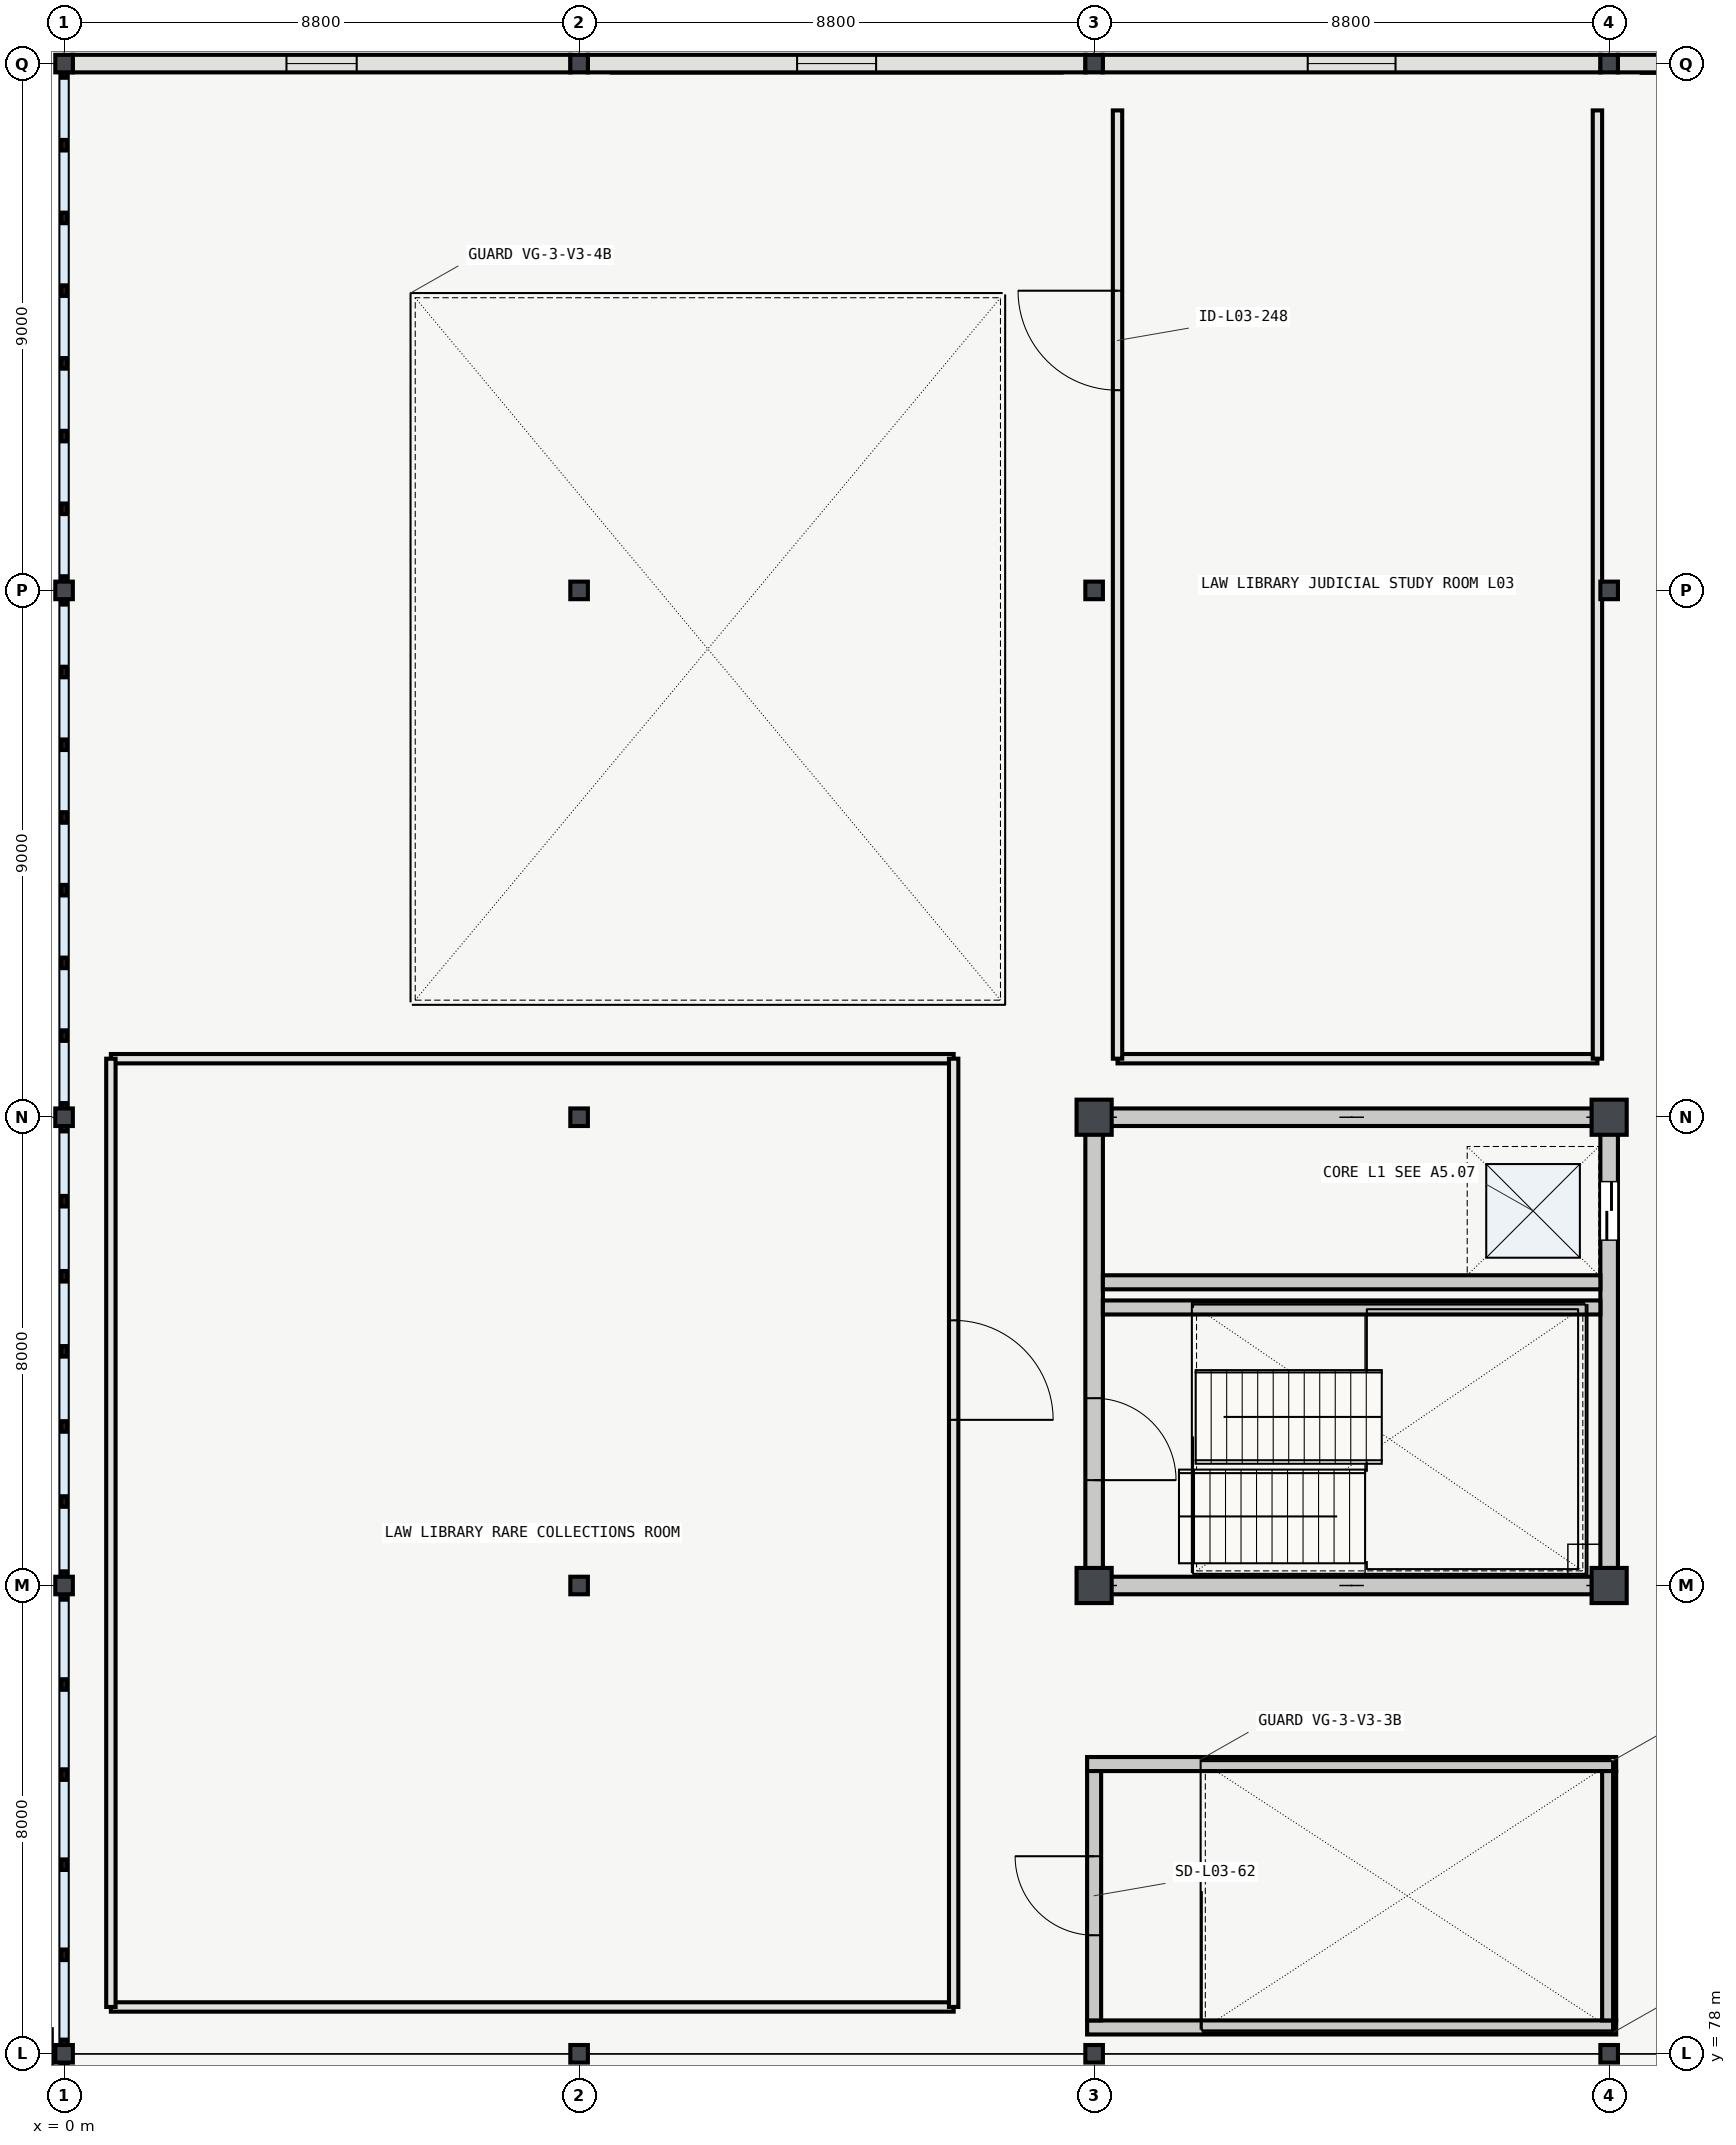
"""IFC4 building model, lengths in metres.
Left out: names, types, materials, properties, quantities, classifications, styles, units other than length and angle.
Written with IfcOpenShell. Run it as: python <this file> out.ifc"""

import sys

from ifc_helpers import new_model, si_unit, direction, frame, frame_2d, origin, origin_2d, place, context, subcontext, project, spatial, rectangle, i_section, extrude, element, fill, save


model = new_model("IFC4")
c1 = context("Model", 3, precision=1e-05, world=origin(), true_north=direction((0.0, 1.0)))
c2 = subcontext(c1, "Body", "Model", "MODEL_VIEW")
j1 = project(units=[si_unit("LENGTHUNIT", "METRE"), si_unit("PLANEANGLEUNIT", "RADIAN")], contexts=[c1])
p1 = place(None, origin())
s1 = spatial("IfcSite", under=j1, at=p1, CompositionType="ELEMENT")
p2 = place(p1, origin())
s2 = spatial("IfcBuilding", under=s1, at=p2, CompositionType="ELEMENT")
p3 = place(p2, frame((0.0, 0.0, 16.2)))
s3 = spatial("IfcBuildingStorey", under=s2, at=p3, CompositionType="ELEMENT", Elevation=16.2)
for number, where, z_axis, x_axis in (
    (1, (0.0, 78.0, 0.0), (0.0, 0.0, 1.0), (1.0, 0.0, 0.0)),
    (2, (0.0, 86.0, 0.0), (0.0, 0.0, 1.0), (1.0, 0.0, 0.0)),
    (3, (0.0, 94.0, 0.0), (0.0, 0.0, 1.0), (1.0, 0.0, 0.0)),
    (4, (0.0, 103.0, 0.0), (0.0, 0.0, 1.0), (1.0, 0.0, 0.0)),
    (5, (0.0, 112.0, 0.0), (0.0, 0.0, 1.0), (1.0, 0.0, 0.0)),
    (6, (8.8, 78.0, 0.0), (0.0, 0.0, 1.0), (1.0, 0.0, 0.0)),
    (7, (8.8, 86.0, 0.0), (0.0, 0.0, 1.0), (1.0, 0.0, 0.0)),
    (8, (8.8, 94.0, 0.0), (0.0, 0.0, 1.0), (1.0, 0.0, 0.0)),
    (9, (8.8, 103.0, 0.0), (0.0, 0.0, 1.0), (1.0, 0.0, 0.0)),
    (10, (8.8, 112.0, 0.0), (0.0, 0.0, 1.0), (1.0, 0.0, 0.0)),
    (11, (17.6, 78.0, 0.0), (0.0, 0.0, 1.0), (1.0, 0.0, 0.0)),
):
    element("IfcColumn", number, at=place(p3, frame(where, z_axis=z_axis, x_axis=x_axis)), inside=s3, PredefinedType="COLUMN", context=c2, shape_type="SweptSolid", body=[
        extrude(i_section(OverallWidth=0.3, OverallDepth=0.3, WebThickness=0.01, FlangeThickness=0.015, FilletRadius=0.018, at=origin_2d()), origin(), (0.0, 0.0, 1.0), 4.2),
    ])
for number, where, z_axis, x_axis in (
    (12, (17.6, 86.0, 0.0), (0.0, 0.0, 1.0), (1.0, 0.0, 0.0)),
    (13, (17.6, 94.0, 0.0), (0.0, 0.0, 1.0), (1.0, 0.0, 0.0)),
):
    element("IfcColumn", number, at=place(p3, frame(where, z_axis=z_axis, x_axis=x_axis)), inside=s3, PredefinedType="COLUMN", context=c2, shape_type="SweptSolid", body=[
        extrude(rectangle(XDim=0.6, YDim=0.6, at=origin_2d()), origin(), (0.0, 0.0, 1.0), 4.2),
    ])
for number, where, z_axis, x_axis in (
    (14, (17.6, 103.0, 0.0), (0.0, 0.0, 1.0), (1.0, 0.0, 0.0)),
    (15, (17.6, 112.0, 0.0), (0.0, 0.0, 1.0), (1.0, 0.0, 0.0)),
    (16, (26.4, 78.0, 0.0), (0.0, 0.0, 1.0), (1.0, 0.0, 0.0)),
):
    element("IfcColumn", number, at=place(p3, frame(where, z_axis=z_axis, x_axis=x_axis)), inside=s3, PredefinedType="COLUMN", context=c2, shape_type="SweptSolid", body=[
        extrude(i_section(OverallWidth=0.3, OverallDepth=0.3, WebThickness=0.01, FlangeThickness=0.015, FilletRadius=0.018, at=origin_2d()), origin(), (0.0, 0.0, 1.0), 4.2),
    ])
for number, where, z_axis, x_axis in (
    (17, (26.4, 86.0, 0.0), (0.0, 0.0, 1.0), (1.0, 0.0, 0.0)),
    (18, (26.4, 94.0, 0.0), (0.0, 0.0, 1.0), (1.0, 0.0, 0.0)),
):
    element("IfcColumn", number, at=place(p3, frame(where, z_axis=z_axis, x_axis=x_axis)), inside=s3, PredefinedType="COLUMN", context=c2, shape_type="SweptSolid", body=[
        extrude(rectangle(XDim=0.6, YDim=0.6, at=origin_2d()), origin(), (0.0, 0.0, 1.0), 4.2),
    ])
for number, where, z_axis, x_axis in (
    (19, (26.4, 103.0, 0.0), (0.0, 0.0, 1.0), (1.0, 0.0, 0.0)),
    (20, (26.4, 112.0, 0.0), (0.0, 0.0, 1.0), (1.0, 0.0, 0.0)),
):
    element("IfcColumn", number, at=place(p3, frame(where, z_axis=z_axis, x_axis=x_axis)), inside=s3, PredefinedType="COLUMN", context=c2, shape_type="SweptSolid", body=[
        extrude(i_section(OverallWidth=0.3, OverallDepth=0.3, WebThickness=0.01, FlangeThickness=0.015, FilletRadius=0.018, at=origin_2d()), origin(), (0.0, 0.0, 1.0), 4.2),
    ])
p4 = place(p3, frame((8.654, 112.0, 0.0), z_axis=(0.0, 0.0, 1.0), x_axis=(-1.0, 0.0, 0.0)))
e21 = element("IfcWall", 21, at=p4, inside=s3, PredefinedType="SOLIDWALL", context=c2, shape_type="SweptSolid", body=[
    extrude(rectangle(XDim=8.508, YDim=0.3, at=frame_2d((4.254, 0.0))), origin(), (0.0, 0.0, 1.0), 3.603),
])
p5 = place(p4, frame((3.654, 0.0, 0.95)))
e22 = element("IfcOpeningElement", 22, at=p5, cuts=e21, PredefinedType="OPENING", context=c2, shape_type="SweptSolid", body=[
    extrude(rectangle(XDim=1.2, YDim=2.1, at=frame_2d((0.6, 1.05))), frame((0.0, 0.16, 0.0), z_axis=(0.0, -1.0, 0.0), x_axis=(1.0, 0.0, 0.0)), (0.0, 0.0, 1.0), 0.32),
])
p6 = place(p3, frame((17.454, 112.0, 0.0), z_axis=(0.0, 0.0, 1.0), x_axis=(-1.0, 0.0, 0.0)))
e23 = element("IfcWall", 23, at=p6, inside=s3, PredefinedType="SOLIDWALL", context=c2, shape_type="SweptSolid", body=[
    extrude(rectangle(XDim=8.508, YDim=0.3, at=frame_2d((4.254, 0.0))), origin(), (0.0, 0.0, 1.0), 3.603),
])
p7 = place(p6, frame((3.579, 0.0, 0.95)))
e24 = element("IfcOpeningElement", 24, at=p7, cuts=e23, PredefinedType="OPENING", context=c2, shape_type="SweptSolid", body=[
    extrude(rectangle(XDim=1.35, YDim=2.1, at=frame_2d((0.675, 1.05))), frame((0.0, 0.16, 0.0), z_axis=(0.0, -1.0, 0.0), x_axis=(1.0, 0.0, 0.0)), (0.0, 0.0, 1.0), 0.32),
])
p8 = place(p3, frame((26.254, 112.0, 0.0), z_axis=(0.0, 0.0, 1.0), x_axis=(-1.0, 0.0, 0.0)))
e25 = element("IfcWall", 25, at=p8, inside=s3, PredefinedType="SOLIDWALL", context=c2, shape_type="SweptSolid", body=[
    extrude(rectangle(XDim=8.508, YDim=0.3, at=frame_2d((4.254, 0.0))), origin(), (0.0, 0.0, 1.0), 3.603),
])
p9 = place(p8, frame((3.504, 0.0, 0.95)))
e26 = element("IfcOpeningElement", 26, at=p9, cuts=e25, PredefinedType="OPENING", context=c2, shape_type="SweptSolid", body=[
    extrude(rectangle(XDim=1.5, YDim=2.1, at=frame_2d((0.75, 1.05))), frame((0.0, 0.16, 0.0), z_axis=(0.0, -1.0, 0.0), x_axis=(1.0, 0.0, 0.0)), (0.0, 0.0, 1.0), 0.32),
])
p10 = place(p3, frame((35.054, 112.0, 0.0), z_axis=(0.0, 0.0, 1.0), x_axis=(-1.0, 0.0, 0.0)))
e27 = element("IfcWall", 27, at=p10, inside=s3, PredefinedType="SOLIDWALL", context=c2, shape_type="SweptSolid", body=[
    extrude(rectangle(XDim=8.508, YDim=0.3, at=frame_2d((4.254, 0.0))), origin(), (0.0, 0.0, 1.0), 3.603),
])
p11 = place(p10, frame((3.429, 0.0, 0.95)))
e28 = element("IfcOpeningElement", 28, at=p11, cuts=e27, PredefinedType="OPENING", context=c2, shape_type="SweptSolid", body=[
    extrude(rectangle(XDim=1.65, YDim=2.1, at=frame_2d((0.825, 1.05))), frame((0.0, 0.16, 0.0), z_axis=(0.0, -1.0, 0.0), x_axis=(1.0, 0.0, 0.0)), (0.0, 0.0, 1.0), 0.32),
])
for number, where, z_axis, x_axis in (
    (29, (17.45, 86.0, 0.0), (0.0, 0.0, 1.0), (1.0, 0.0, 0.0)),
    (30, (26.55, 94.0, 0.0), (0.0, 0.0, 1.0), (-1.0, 0.0, 0.0)),
):
    element("IfcWall", number, at=place(p3, frame(where, z_axis=z_axis, x_axis=x_axis)), inside=s3, PredefinedType="SHEAR", context=c2, shape_type="SweptSolid", body=[
        extrude(rectangle(XDim=9.1, YDim=0.3, at=frame_2d((4.55, 0.0))), origin(), (0.0, 0.0, 1.0), 3.92),
    ])
p12 = place(p3, frame((17.6, 86.15, 0.0), z_axis=(0.0, 0.0, 1.0), x_axis=(0.0, 1.0, 0.0)))
e31 = element("IfcWall", 31, at=p12, inside=s3, PredefinedType="SHEAR", context=c2, shape_type="SweptSolid", body=[
    extrude(rectangle(XDim=7.7, YDim=0.3, at=frame_2d((3.85, 0.0))), origin(), (0.0, 0.0, 1.0), 3.92),
])
p13 = place(p12, frame((1.65, 0.0, 0.0)))
e32 = element("IfcOpeningElement", 32, at=p13, cuts=e31, PredefinedType="OPENING", context=c2, shape_type="SweptSolid", body=[
    extrude(rectangle(XDim=1.4, YDim=2.2, at=frame_2d((0.7, 1.1))), frame((0.0, 0.16, 0.0), z_axis=(0.0, -1.0, 0.0), x_axis=(1.0, 0.0, 0.0)), (0.0, 0.0, 1.0), 0.32),
])
p14 = place(p3, frame((26.4, 86.15, 0.0), z_axis=(0.0, 0.0, 1.0), x_axis=(0.0, 1.0, 0.0)))
e33 = element("IfcWall", 33, at=p14, inside=s3, PredefinedType="SHEAR", context=c2, shape_type="SweptSolid", body=[
    extrude(rectangle(XDim=7.7, YDim=0.3, at=frame_2d((3.85, 0.0))), origin(), (0.0, 0.0, 1.0), 3.92),
])
p15 = place(p14, frame((5.75, 0.0, 0.0)))
e34 = element("IfcOpeningElement", 34, at=p15, cuts=e33, PredefinedType="OPENING", context=c2, shape_type="SweptSolid", body=[
    extrude(rectangle(XDim=1.0, YDim=2.15, at=frame_2d((0.5, 1.075))), frame((0.0, 0.16, 0.0), z_axis=(0.0, -1.0, 0.0), x_axis=(1.0, 0.0, 0.0)), (0.0, 0.0, 1.0), 0.32),
])
p16 = place(p3, frame((17.75, 91.18, 0.0), z_axis=(0.0, 0.0, 1.0), x_axis=(1.0, 0.0, 0.0)))
e35 = element("IfcWall", 35, at=p16, inside=s3, PredefinedType="SHEAR", context=c2, shape_type="SweptSolid", body=[
    extrude(rectangle(XDim=8.5, YDim=0.24, at=frame_2d((4.25, 0.0))), origin(), (0.0, 0.0, 1.0), 3.92),
])
for number, where, z_axis, x_axis in (
    (36, (0.8, 78.8, 0.0), (0.0, 0.0, 1.0), (1.0, 0.0, 0.0)),
    (37, (15.2, 95.0, 0.0), (0.0, 0.0, 1.0), (-1.0, 0.0, 0.0)),
):
    element("IfcWall", number, at=place(p3, frame(where, z_axis=z_axis, x_axis=x_axis)), inside=s3, PredefinedType="PARTITIONING", context=c2, shape_type="SweptSolid", body=[
        extrude(rectangle(XDim=14.4, YDim=0.16, at=frame_2d((7.2, 0.0))), origin(), (0.0, 0.0, 1.0), 3.92),
    ])
p17 = place(p3, frame((0.8, 95.0, 0.0), z_axis=(0.0, 0.0, 1.0), x_axis=(0.0, -1.0, 0.0)))
e38 = element("IfcWall", 38, at=p17, inside=s3, PredefinedType="PARTITIONING", context=c2, shape_type="SweptSolid", body=[
    extrude(rectangle(XDim=16.2, YDim=0.16, at=frame_2d((8.1, 0.0))), origin(), (0.0, 0.0, 1.0), 3.92),
])
p18 = place(p3, frame((15.2, 78.8, 0.0), z_axis=(0.0, 0.0, 1.0), x_axis=(0.0, 1.0, 0.0)))
e39 = element("IfcWall", 39, at=p18, inside=s3, PredefinedType="PARTITIONING", context=c2, shape_type="SweptSolid", body=[
    extrude(rectangle(XDim=16.2, YDim=0.16, at=frame_2d((8.1, 0.0))), origin(), (0.0, 0.0, 1.0), 3.92),
])
p19 = place(p18, frame((10.03, 0.0, 0.0)))
e40 = element("IfcOpeningElement", 40, at=p19, cuts=e39, PredefinedType="OPENING", context=c2, shape_type="SweptSolid", body=[
    extrude(rectangle(XDim=1.7, YDim=2.3, at=frame_2d((0.85, 1.15))), frame((0.0, 0.09, 0.0), z_axis=(0.0, -1.0, 0.0), x_axis=(1.0, 0.0, 0.0)), (0.0, 0.0, 1.0), 0.18),
])
p20 = place(p3, frame((18.0, 95.0, 0.0), z_axis=(0.0, 0.0, 1.0), x_axis=(1.0, 0.0, 0.0)))
e41 = element("IfcWall", 41, at=p20, inside=s3, PredefinedType="PARTITIONING", context=c2, shape_type="SweptSolid", body=[
    extrude(rectangle(XDim=8.2, YDim=0.16, at=frame_2d((4.1, 0.0))), origin(), (0.0, 0.0, 1.0), 3.92),
])
p21 = place(p3, frame((18.0, 111.2, 0.0), z_axis=(0.0, 0.0, 1.0), x_axis=(0.0, -1.0, 0.0)))
e42 = element("IfcWall", 42, at=p21, inside=s3, PredefinedType="PARTITIONING", context=c2, shape_type="SweptSolid", body=[
    extrude(rectangle(XDim=16.2, YDim=0.16, at=frame_2d((8.1, 0.0))), origin(), (0.0, 0.0, 1.0), 3.92),
])
p22 = place(p21, frame((3.08, 0.0, 0.0)))
e43 = element("IfcOpeningElement", 43, at=p22, cuts=e42, PredefinedType="OPENING", context=c2, shape_type="SweptSolid", body=[
    extrude(rectangle(XDim=1.7, YDim=2.3, at=frame_2d((0.85, 1.15))), frame((0.0, 0.09, 0.0), z_axis=(0.0, -1.0, 0.0), x_axis=(1.0, 0.0, 0.0)), (0.0, 0.0, 1.0), 0.18),
])
p23 = place(p3, frame((26.2, 95.0, 0.0), z_axis=(0.0, 0.0, 1.0), x_axis=(0.0, 1.0, 0.0)))
e44 = element("IfcWall", 44, at=p23, inside=s3, PredefinedType="PARTITIONING", context=c2, shape_type="SweptSolid", body=[
    extrude(rectangle(XDim=16.2, YDim=0.16, at=frame_2d((8.1, 0.0))), origin(), (0.0, 0.0, 1.0), 3.566),
])
p24 = place(p3, frame((17.75, 90.75, 0.0), z_axis=(0.0, 0.0, 1.0), x_axis=(1.0, 0.0, 0.0)))
e45 = element("IfcWall", 45, at=p24, inside=s3, PredefinedType="SHEAR", context=c2, shape_type="SweptSolid", body=[
    extrude(rectangle(XDim=8.5, YDim=0.24, at=frame_2d((4.25, 0.0))), origin(), (0.0, 0.0, 1.0), 3.95),
])
for number, where, z_axis, x_axis in (
    (46, (17.48, 78.45, 0.0), (0.0, 0.0, 1.0), (1.0, 0.0, 0.0)),
    (47, (26.52, 82.95, 0.0), (0.0, 0.0, 1.0), (-1.0, 0.0, 0.0)),
):
    element("IfcWall", number, at=place(p3, frame(where, z_axis=z_axis, x_axis=x_axis)), inside=s3, PredefinedType="SHEAR", context=c2, shape_type="SweptSolid", body=[
        extrude(rectangle(XDim=9.04, YDim=0.24, at=frame_2d((4.52, 0.0))), origin(), (0.0, 0.0, 1.0), 3.95),
    ])
p25 = place(p3, frame((17.6, 78.57, 0.0), z_axis=(0.0, 0.0, 1.0), x_axis=(0.0, 1.0, 0.0)))
e48 = element("IfcWall", 48, at=p25, inside=s3, PredefinedType="SHEAR", context=c2, shape_type="SweptSolid", body=[
    extrude(rectangle(XDim=4.26, YDim=0.24, at=frame_2d((2.13, 0.0))), origin(), (0.0, 0.0, 1.0), 3.95),
])
p26 = place(p25, frame((1.455, 0.0, 0.0)))
e49 = element("IfcOpeningElement", 49, at=p26, cuts=e48, PredefinedType="OPENING", context=c2, shape_type="SweptSolid", body=[
    extrude(rectangle(XDim=1.35, YDim=2.2, at=frame_2d((0.675, 1.1))), frame((0.0, 0.13, 0.0), z_axis=(0.0, -1.0, 0.0), x_axis=(1.0, 0.0, 0.0)), (0.0, 0.0, 1.0), 0.26),
])
p27 = place(p3, frame((26.4, 78.57, 0.0), z_axis=(0.0, 0.0, 1.0), x_axis=(0.0, 1.0, 0.0)))
e50 = element("IfcWall", 50, at=p27, inside=s3, PredefinedType="SHEAR", context=c2, shape_type="SweptSolid", body=[
    extrude(rectangle(XDim=4.26, YDim=0.24, at=frame_2d((2.13, 0.0))), origin(), (0.0, 0.0, 1.0), 3.95),
])
p28 = place(p5, origin())
e51 = element("IfcWindow", 51, at=p28, inside=s3, PartitioningType="SINGLE_PANEL", PredefinedType="WINDOW", context=c2, shape_type="SweptSolid", body=[
    extrude(rectangle(XDim=1.2, YDim=2.1, at=frame_2d((0.6, 1.05))), frame((0.0, 0.03, 0.0), z_axis=(0.0, -1.0, 0.0), x_axis=(1.0, 0.0, 0.0)), (0.0, 0.0, 1.0), 0.06),
])
fill(e22, e51)
p29 = place(p7, origin())
e52 = element("IfcWindow", 52, at=p29, inside=s3, PartitioningType="SINGLE_PANEL", PredefinedType="WINDOW", context=c2, shape_type="SweptSolid", body=[
    extrude(rectangle(XDim=1.35, YDim=2.1, at=frame_2d((0.675, 1.05))), frame((0.0, 0.03, 0.0), z_axis=(0.0, -1.0, 0.0), x_axis=(1.0, 0.0, 0.0)), (0.0, 0.0, 1.0), 0.06),
])
fill(e24, e52)
p30 = place(p9, origin())
e53 = element("IfcWindow", 53, at=p30, inside=s3, PartitioningType="SINGLE_PANEL", PredefinedType="WINDOW", context=c2, shape_type="SweptSolid", body=[
    extrude(rectangle(XDim=1.5, YDim=2.1, at=frame_2d((0.75, 1.05))), frame((0.0, 0.03, 0.0), z_axis=(0.0, -1.0, 0.0), x_axis=(1.0, 0.0, 0.0)), (0.0, 0.0, 1.0), 0.06),
])
fill(e26, e53)
p31 = place(p13, origin())
e54 = element("IfcDoor", 54, at=p31, inside=s3, OperationType="SINGLE_SWING_LEFT", PredefinedType="DOOR", context=c2, shape_type="SweptSolid", body=[
    extrude(rectangle(XDim=1.4, YDim=2.2, at=frame_2d((0.7, 1.1))), frame((0.0, 0.025, 0.0), z_axis=(0.0, -1.0, 0.0), x_axis=(1.0, 0.0, 0.0)), (0.0, 0.0, 1.0), 0.05),
])
fill(e32, e54)
p32 = place(p15, origin())
e55 = element("IfcDoor", 55, at=p32, inside=s3, OperationType="DOUBLE_DOOR_SLIDING", PredefinedType="DOOR", context=c2, shape_type="SweptSolid", body=[
    extrude(rectangle(XDim=1.0, YDim=2.15, at=frame_2d((0.5, 1.075))), frame((0.0, 0.025, 0.0), z_axis=(0.0, -1.0, 0.0), x_axis=(1.0, 0.0, 0.0)), (0.0, 0.0, 1.0), 0.05),
])
fill(e34, e55)
p33 = place(p19, origin())
e56 = element("IfcDoor", 56, at=p33, inside=s3, OperationType="DOUBLE_DOOR_SINGLE_SWING", PredefinedType="DOOR", context=c2, shape_type="SweptSolid", body=[
    extrude(rectangle(XDim=1.7, YDim=2.3, at=frame_2d((0.85, 1.15))), frame((0.0, 0.025, 0.0), z_axis=(0.0, -1.0, 0.0), x_axis=(1.0, 0.0, 0.0)), (0.0, 0.0, 1.0), 0.05),
])
fill(e40, e56)
p34 = place(p22, origin())
e57 = element("IfcDoor", 57, at=p34, inside=s3, OperationType="DOUBLE_DOOR_SINGLE_SWING", PredefinedType="DOOR", context=c2, shape_type="SweptSolid", body=[
    extrude(rectangle(XDim=1.7, YDim=2.3, at=frame_2d((0.85, 1.15))), frame((0.0, 0.025, 0.0), z_axis=(0.0, -1.0, 0.0), x_axis=(1.0, 0.0, 0.0)), (0.0, 0.0, 1.0), 0.05),
])
fill(e43, e57)
p35 = place(p26, origin())
e58 = element("IfcDoor", 58, at=p35, inside=s3, OperationType="SINGLE_SWING_RIGHT", PredefinedType="DOOR", context=c2, shape_type="SweptSolid", body=[
    extrude(rectangle(XDim=1.35, YDim=2.2, at=frame_2d((0.675, 1.1))), frame((0.0, 0.025, 0.0), z_axis=(0.0, -1.0, 0.0), x_axis=(1.0, 0.0, 0.0)), (0.0, 0.0, 1.0), 0.05),
])
fill(e49, e58)
save(model, sys.argv[1])
